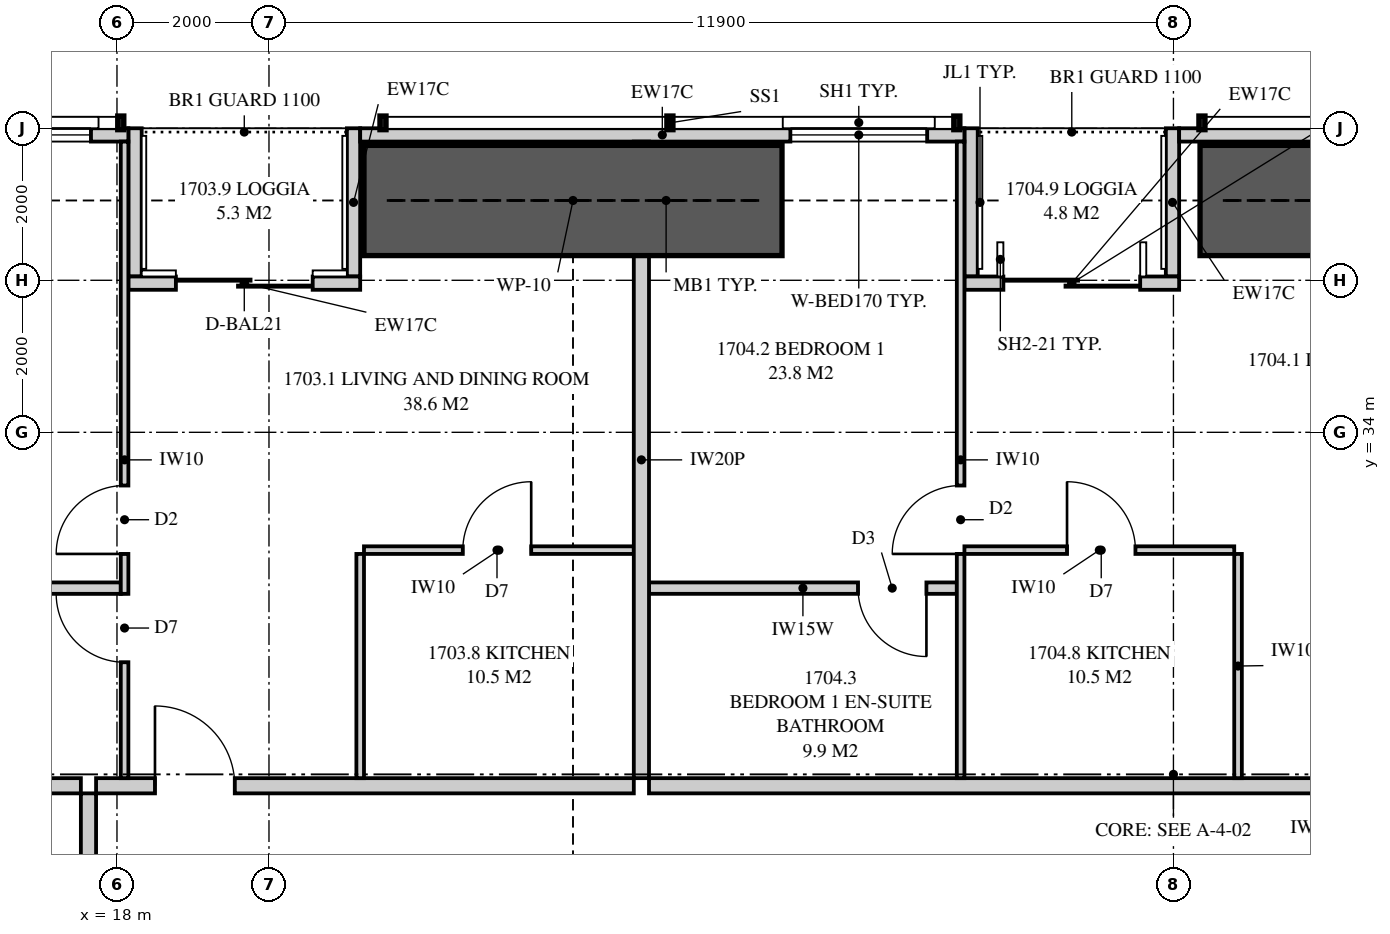
"""IFC4 building model, lengths in metres.
Left out: names, types, materials, properties, quantities, classifications, styles, units other than length and angle.
Written with IfcOpenShell. Run it as: python <this file> out.ifc"""

import sys

from ifc_helpers import new_model, si_unit, direction, frame, frame_2d, origin, place, context, subcontext, project, spatial, polyline, rectangle, outline, extrude, element, fill, save


model = new_model("IFC4")
c1 = context("Model", 3, precision=1e-05, world=origin(), true_north=direction((0.0, 1.0)))
c2 = subcontext(c1, "Body", "Model", "MODEL_VIEW")
j1 = project(units=[si_unit("LENGTHUNIT", "METRE"), si_unit("PLANEANGLEUNIT", "RADIAN")], contexts=[c1])
p1 = place(None, origin())
s1 = spatial("IfcSite", under=j1, at=p1, CompositionType="ELEMENT")
p2 = place(p1, origin())
s2 = spatial("IfcBuilding", under=s1, at=p2, CompositionType="ELEMENT")
p3 = place(p2, frame((0.0, 0.0, 64.55)))
s3 = spatial("IfcBuildingStorey", under=s2, at=p3, CompositionType="ELEMENT", Elevation=64.55)
p4 = place(p3, frame((42.949, 37.913, 0.0), z_axis=(0.0, 0.0, 1.0), x_axis=(-1.0, 0.0, 0.0)))
e1 = element("IfcWall", 1, at=p4, inside=s3, PredefinedType="SOLIDWALL", context=c2, shape_type="SweptSolid", body=[
    extrude(outline(polyline([(0.0, 0.0), (10.974, 0.0), (10.974, 2.15), (7.949, 2.15), (7.949, 3.11), (7.793, 3.11), (7.793, 2.15), (7.745, 2.15), (7.745, 3.11), (0.0, 3.11), (0.0, 0.0)])), frame((0.0, 0.087, 0.0), z_axis=(0.0, -1.0, 0.0), x_axis=(1.0, 0.0, 0.0)), (0.0, 0.0, 1.0), 0.175),
])
p5 = place(p4, frame((2.249, 0.0, 0.4)))
e2 = element("IfcOpeningElement", 2, at=p5, cuts=e1, PredefinedType="OPENING", context=c2, shape_type="SweptSolid", body=[
    extrude(rectangle(XDim=1.8, YDim=1.7, at=frame_2d((0.9, 0.85))), frame((0.0, 0.097, 0.0), z_axis=(0.0, -1.0, 0.0), x_axis=(1.0, 0.0, 0.0)), (0.0, 0.0, 1.0), 0.195),
])
p6 = place(p3, frame((29.15, 37.913, 0.0), z_axis=(0.0, 0.0, 1.0), x_axis=(-1.0, 0.0, 0.0)))
e3 = element("IfcWall", 3, at=p6, inside=s3, PredefinedType="SOLIDWALL", context=c2, shape_type="SweptSolid", body=[
    extrude(rectangle(XDim=7.95, YDim=0.175, at=frame_2d((3.975, 0.0))), origin(), (0.0, 0.0, 1.0), 2.15),
])
p7 = place(p6, frame((0.49, 0.0, 0.4)))
e4 = element("IfcOpeningElement", 4, at=p7, cuts=e3, PredefinedType="OPENING", context=c2, shape_type="SweptSolid", body=[
    extrude(rectangle(XDim=1.8, YDim=1.7, at=frame_2d((0.9, 0.85))), frame((0.0, 0.097, 0.0), z_axis=(0.0, -1.0, 0.0), x_axis=(1.0, 0.0, 0.0)), (0.0, 0.0, 1.0), 0.195),
])
p8 = place(p3, frame((18.15, 37.913, 0.0), z_axis=(0.0, 0.0, 1.0), x_axis=(-1.0, 0.0, 0.0)))
e5 = element("IfcWall", 5, at=p8, inside=s3, PredefinedType="SOLIDWALL", context=c2, shape_type="SweptSolid", body=[
    extrude(outline(polyline([(0.0, 0.0), (13.099, 0.0), (13.099, 3.11), (5.354, 3.11), (5.354, 2.15), (5.306, 2.15), (5.306, 3.11), (5.15, 3.11), (5.15, 2.15), (0.0, 2.15), (0.0, 0.0)])), frame((0.0, 0.087, 0.0), z_axis=(0.0, -1.0, 0.0), x_axis=(1.0, 0.0, 0.0)), (0.0, 0.0, 1.0), 0.175),
])
p9 = place(p8, frame((0.492, 0.0, 0.4)))
e6 = element("IfcOpeningElement", 6, at=p9, cuts=e5, PredefinedType="OPENING", context=c2, shape_type="SweptSolid", body=[
    extrude(rectangle(XDim=1.8, YDim=1.7, at=frame_2d((0.9, 0.85))), frame((0.0, 0.097, 0.0), z_axis=(0.0, -1.0, 0.0), x_axis=(1.0, 0.0, 0.0)), (0.0, 0.0, 1.0), 0.195),
])
p10 = place(p8, frame((8.065, 0.0, 0.4)))
e7 = element("IfcOpeningElement", 7, at=p10, cuts=e5, PredefinedType="OPENING", context=c2, shape_type="SweptSolid", body=[
    extrude(rectangle(XDim=1.8, YDim=1.7, at=frame_2d((0.9, 0.85))), frame((0.0, 0.097, 0.0), z_axis=(0.0, -1.0, 0.0), x_axis=(1.0, 0.0, 0.0)), (0.0, 0.0, 1.0), 0.195),
])
p11 = place(p3, frame((31.975, 35.962, 0.0), z_axis=(0.0, 0.0, 1.0), x_axis=(-1.0, 0.0, 0.0)))
e8 = element("IfcWall", 8, at=p11, inside=s3, PredefinedType="SOLIDWALL", context=c2, shape_type="SweptSolid", body=[
    extrude(rectangle(XDim=2.825, YDim=0.175, at=frame_2d((1.413, 0.0))), origin(), (0.0, 0.0, 1.0), 3.11),
])
p12 = place(p11, frame((0.512, 0.0, 0.0)))
e9 = element("IfcOpeningElement", 9, at=p12, cuts=e8, PredefinedType="OPENING", context=c2, shape_type="SweptSolid", body=[
    extrude(rectangle(XDim=1.8, YDim=2.1, at=frame_2d((0.9, 1.05))), frame((0.0, 0.097, 0.0), z_axis=(0.0, -1.0, 0.0), x_axis=(1.0, 0.0, 0.0)), (0.0, 0.0, 1.0), 0.195),
])
for number, where, z_axis, x_axis in (
    (10, (31.887, 38.0, 0.0), (0.0, 0.0, 1.0), (0.0, -1.0, 0.0)),
    (11, (29.238, 38.0, 0.0), (0.0, 0.0, 1.0), (0.0, -1.0, 0.0)),
):
    element("IfcWall", number, at=place(p3, frame(where, z_axis=z_axis, x_axis=x_axis)), inside=s3, PredefinedType="SOLIDWALL", context=c2, shape_type="SweptSolid", body=[
        extrude(outline(polyline([(0.0, 0.0), (1.95, 0.0), (1.95, 3.11), (1.75, 3.11), (1.75, 2.15), (0.15, 2.15), (0.15, 3.11), (0.0, 3.11), (0.0, 0.0)])), frame((0.0, 0.087, 0.0), z_axis=(0.0, -1.0, 0.0), x_axis=(1.0, 0.0, 0.0)), (0.0, 0.0, 1.0), 0.175),
    ])
p13 = place(p3, frame((21.2, 35.962, 0.0), z_axis=(0.0, 0.0, 1.0), x_axis=(-1.0, 0.0, 0.0)))
e12 = element("IfcWall", 12, at=p13, inside=s3, PredefinedType="SOLIDWALL", context=c2, shape_type="SweptSolid", body=[
    extrude(rectangle(XDim=3.05, YDim=0.175, at=frame_2d((1.525, 0.0))), origin(), (0.0, 0.0, 1.0), 3.11),
])
p14 = place(p13, frame((0.625, 0.0, 0.0)))
e13 = element("IfcOpeningElement", 13, at=p14, cuts=e12, PredefinedType="OPENING", context=c2, shape_type="SweptSolid", body=[
    extrude(rectangle(XDim=1.8, YDim=2.1, at=frame_2d((0.9, 1.05))), frame((0.0, 0.097, 0.0), z_axis=(0.0, -1.0, 0.0), x_axis=(1.0, 0.0, 0.0)), (0.0, 0.0, 1.0), 0.195),
])
for number, where, z_axis, x_axis in (
    (14, (21.113, 38.0, 0.0), (0.0, 0.0, 1.0), (0.0, -1.0, 0.0)),
    (15, (18.238, 38.0, 0.0), (0.0, 0.0, 1.0), (0.0, -1.0, 0.0)),
):
    element("IfcWall", number, at=place(p3, frame(where, z_axis=z_axis, x_axis=x_axis)), inside=s3, PredefinedType="SOLIDWALL", context=c2, shape_type="SweptSolid", body=[
        extrude(outline(polyline([(0.0, 0.0), (1.95, 0.0), (1.95, 3.11), (1.75, 3.11), (1.75, 2.15), (0.15, 2.15), (0.15, 3.11), (0.0, 3.11), (0.0, 0.0)])), frame((0.0, 0.087, 0.0), z_axis=(0.0, -1.0, 0.0), x_axis=(1.0, 0.0, 0.0)), (0.0, 0.0, 1.0), 0.175),
    ])
p15 = place(p3, frame((24.9, 37.825, 0.0), z_axis=(0.0, 0.0, 1.0), x_axis=(0.0, -1.0, 0.0)))
e16 = element("IfcWall", 16, at=p15, inside=s3, PredefinedType="PARTITIONING", context=c2, shape_type="SweptSolid", body=[
    extrude(outline(polyline([(0.529, 2.15), (0.0, 2.15), (0.0, 0.0), (0.529, 0.0), (0.529, 0.889), (1.021, 0.889), (1.021, 0.0), (8.375, 0.0), (8.375, 3.11), (1.685, 3.11), (1.685, 2.15), (1.021, 2.15), (1.021, 1.261), (0.529, 1.261), (0.529, 2.15)])), frame((0.0, 0.1, 0.0), z_axis=(0.0, -1.0, 0.0), x_axis=(1.0, 0.0, 0.0)), (0.0, 0.0, 1.0), 0.2),
])
p16 = place(p3, frame((17.725, 29.35, 0.0), z_axis=(0.0, 0.0, 1.0), x_axis=(1.0, 0.0, 0.0)))
e17 = element("IfcWall", 17, at=p16, inside=s3, PredefinedType="PARTITIONING", context=c2, shape_type="SweptSolid", body=[
    extrude(outline(polyline([(0.0, 0.0), (7.075, 0.0), (7.075, 3.11), (6.612, 3.11), (6.612, 2.541), (5.938, 2.541), (5.938, 3.11), (0.0, 3.11), (0.0, 0.0)])), frame((0.0, 0.1, 0.0), z_axis=(0.0, -1.0, 0.0), x_axis=(1.0, 0.0, 0.0)), (0.0, 0.0, 1.0), 0.2),
])
p17 = place(p16, frame((0.775, 0.0, 0.0)))
e18 = element("IfcOpeningElement", 18, at=p17, cuts=e17, PredefinedType="OPENING", context=c2, shape_type="SweptSolid", body=[
    extrude(rectangle(XDim=1.05, YDim=2.2, at=frame_2d((0.525, 1.1))), frame((0.0, 0.11, 0.0), z_axis=(0.0, -1.0, 0.0), x_axis=(1.0, 0.0, 0.0)), (0.0, 0.0, 1.0), 0.22),
])
p18 = place(p3, frame((18.1, 37.825, 0.0), z_axis=(0.0, 0.0, 1.0), x_axis=(0.0, -1.0, 0.0)))
e19 = element("IfcWall", 19, at=p18, inside=s3, PredefinedType="PARTITIONING", context=c2, shape_type="SweptSolid", body=[
    extrude(outline(polyline([(0.0, 0.0), (8.375, 0.0), (8.375, 3.11), (1.635, 3.11), (1.635, 2.15), (0.0, 2.15), (0.0, 3.11), (0.0, 0.0)])), frame((0.0, 0.05, 0.0), z_axis=(0.0, -1.0, 0.0), x_axis=(1.0, 0.0, 0.0)), (0.0, 0.0, 1.0), 0.1),
])
p19 = place(p18, frame((4.525, 0.0, 0.0)))
e20 = element("IfcOpeningElement", 20, at=p19, cuts=e19, PredefinedType="OPENING", context=c2, shape_type="SweptSolid", body=[
    extrude(rectangle(XDim=0.9, YDim=2.1, at=frame_2d((0.45, 1.05))), frame((0.0, 0.06, 0.0), z_axis=(0.0, -1.0, 0.0), x_axis=(1.0, 0.0, 0.0)), (0.0, 0.0, 1.0), 0.12),
])
p20 = place(p18, frame((5.95, 0.0, 0.0)))
e21 = element("IfcOpeningElement", 21, at=p20, cuts=e19, PredefinedType="OPENING", context=c2, shape_type="SweptSolid", body=[
    extrude(rectangle(XDim=0.9, YDim=2.1, at=frame_2d((0.45, 1.05))), frame((0.0, 0.06, 0.0), z_axis=(0.0, -1.0, 0.0), x_axis=(1.0, 0.0, 0.0)), (0.0, 0.0, 1.0), 0.12),
])
p21 = place(p3, frame((13.85, 31.95, 0.0), z_axis=(0.0, 0.0, 1.0), x_axis=(1.0, 0.0, 0.0)))
e22 = element("IfcWall", 22, at=p21, inside=s3, PredefinedType="PLUMBINGWALL", context=c2, shape_type="SweptSolid", body=[
    extrude(rectangle(XDim=4.2, YDim=0.15, at=frame_2d((2.1, 0.0))), origin(), (0.0, 0.0, 1.0), 3.11),
])
p22 = place(p3, frame((21.25, 32.45, 0.0), z_axis=(0.0, 0.0, 1.0), x_axis=(1.0, 0.0, 0.0)))
e23 = element("IfcWall", 23, at=p22, inside=s3, PredefinedType="PARTITIONING", context=c2, shape_type="SweptSolid", body=[
    extrude(outline(polyline([(0.0, 0.0), (3.55, 0.0), (3.55, 3.11), (3.037, 3.11), (3.037, 2.541), (2.463, 2.541), (2.463, 3.11), (0.0, 3.11), (0.0, 0.0)])), frame((0.0, 0.05, 0.0), z_axis=(0.0, -1.0, 0.0), x_axis=(1.0, 0.0, 0.0)), (0.0, 0.0, 1.0), 0.1),
])
p23 = place(p22, frame((1.3, 0.0, 0.0)))
e24 = element("IfcOpeningElement", 24, at=p23, cuts=e23, PredefinedType="OPENING", context=c2, shape_type="SweptSolid", body=[
    extrude(rectangle(XDim=0.9, YDim=2.1, at=frame_2d((0.45, 1.05))), frame((0.0, 0.06, 0.0), z_axis=(0.0, -1.0, 0.0), x_axis=(1.0, 0.0, 0.0)), (0.0, 0.0, 1.0), 0.12),
])
p24 = place(p3, frame((21.2, 32.4, 0.0), z_axis=(0.0, 0.0, 1.0), x_axis=(0.0, -1.0, 0.0)))
e25 = element("IfcWall", 25, at=p24, inside=s3, PredefinedType="PARTITIONING", context=c2, shape_type="SweptSolid", body=[
    extrude(rectangle(XDim=2.95, YDim=0.1, at=frame_2d((1.475, 0.0))), origin(), (0.0, 0.0, 1.0), 3.11),
])
p25 = place(p3, frame((25.0, 29.35, 0.0), z_axis=(0.0, 0.0, 1.0), x_axis=(1.0, 0.0, 0.0)))
e26 = element("IfcWall", 26, at=p25, inside=s3, PredefinedType="PARTITIONING", context=c2, shape_type="SweptSolid", body=[
    extrude(rectangle(XDim=9.05, YDim=0.2, at=frame_2d((4.525, 0.0))), origin(), (0.0, 0.0, 1.0), 3.11),
])
p26 = place(p3, frame((29.1, 37.825, 0.0), z_axis=(0.0, 0.0, 1.0), x_axis=(0.0, -1.0, 0.0)))
e27 = element("IfcWall", 27, at=p26, inside=s3, PredefinedType="PARTITIONING", context=c2, shape_type="SweptSolid", body=[
    extrude(outline(polyline([(0.0, 0.0), (8.375, 0.0), (8.375, 3.11), (1.635, 3.11), (1.635, 2.15), (0.0, 2.15), (0.0, 3.11), (0.0, 0.0)])), frame((0.0, 0.05, 0.0), z_axis=(0.0, -1.0, 0.0), x_axis=(1.0, 0.0, 0.0)), (0.0, 0.0, 1.0), 0.1),
])
p27 = place(p26, frame((4.525, 0.0, 0.0)))
e28 = element("IfcOpeningElement", 28, at=p27, cuts=e27, PredefinedType="OPENING", context=c2, shape_type="SweptSolid", body=[
    extrude(rectangle(XDim=0.9, YDim=2.1, at=frame_2d((0.45, 1.05))), frame((0.0, 0.06, 0.0), z_axis=(0.0, -1.0, 0.0), x_axis=(1.0, 0.0, 0.0)), (0.0, 0.0, 1.0), 0.12),
])
p28 = place(p3, frame((25.0, 31.95, 0.0), z_axis=(0.0, 0.0, 1.0), x_axis=(1.0, 0.0, 0.0)))
e29 = element("IfcWall", 29, at=p28, inside=s3, PredefinedType="PLUMBINGWALL", context=c2, shape_type="SweptSolid", body=[
    extrude(rectangle(XDim=4.05, YDim=0.15, at=frame_2d((2.025, 0.0))), origin(), (0.0, 0.0, 1.0), 3.11),
])
p29 = place(p28, frame((2.75, 0.0, 0.0)))
e30 = element("IfcOpeningElement", 30, at=p29, cuts=e29, PredefinedType="OPENING", context=c2, shape_type="SweptSolid", body=[
    extrude(rectangle(XDim=0.9, YDim=2.1, at=frame_2d((0.45, 1.05))), frame((0.0, 0.085, 0.0), z_axis=(0.0, -1.0, 0.0), x_axis=(1.0, 0.0, 0.0)), (0.0, 0.0, 1.0), 0.17),
])
p30 = place(p3, frame((29.15, 32.45, 0.0), z_axis=(0.0, 0.0, 1.0), x_axis=(1.0, 0.0, 0.0)))
e31 = element("IfcWall", 31, at=p30, inside=s3, PredefinedType="PARTITIONING", context=c2, shape_type="SweptSolid", body=[
    extrude(rectangle(XDim=3.55, YDim=0.1, at=frame_2d((1.775, 0.0))), origin(), (0.0, 0.0, 1.0), 3.11),
])
p31 = place(p30, frame((1.35, 0.0, 0.0)))
e32 = element("IfcOpeningElement", 32, at=p31, cuts=e31, PredefinedType="OPENING", context=c2, shape_type="SweptSolid", body=[
    extrude(rectangle(XDim=0.9, YDim=2.1, at=frame_2d((0.45, 1.05))), frame((0.0, 0.06, 0.0), z_axis=(0.0, -1.0, 0.0), x_axis=(1.0, 0.0, 0.0)), (0.0, 0.0, 1.0), 0.12),
])
p32 = place(p3, frame((32.75, 32.4, 0.0), z_axis=(0.0, 0.0, 1.0), x_axis=(0.0, -1.0, 0.0)))
e33 = element("IfcWall", 33, at=p32, inside=s3, PredefinedType="PARTITIONING", context=c2, shape_type="SweptSolid", body=[
    extrude(rectangle(XDim=2.95, YDim=0.1, at=frame_2d((1.475, 0.0))), origin(), (0.0, 0.0, 1.0), 3.11),
])
p33 = place(p3, frame((2.0, 29.35, 0.0), z_axis=(0.0, 0.0, 1.0), x_axis=(1.0, 0.0, 0.0)))
e34 = element("IfcWall", 34, at=p33, inside=s3, PredefinedType="PARTITIONING", context=c2, shape_type="SweptSolid", body=[
    extrude(outline(polyline([(0.0, 0.0), (15.525, 0.0), (15.525, 3.11), (11.337, 3.11), (11.337, 2.541), (10.663, 2.541), (10.663, 3.11), (9.51, 3.11), (9.51, 2.51), (6.89, 2.51), (6.89, 3.11), (2.969, 3.11), (2.969, 2.541), (2.577, 2.541), (2.577, 2.15), (0.733, 2.15), (0.733, 3.11), (0.0, 3.11), (0.0, 0.0)])), frame((0.0, 0.1, 0.0), z_axis=(0.0, -1.0, 0.0), x_axis=(1.0, 0.0, 0.0)), (0.0, 0.0, 1.0), 0.2),
])
p34 = place(p3, frame((17.625, 14.1, 0.0), z_axis=(0.0, 0.0, 1.0), x_axis=(0.0, 1.0, 0.0)))
e35 = element("IfcWall", 35, at=p34, inside=s3, PredefinedType="PARTITIONING", context=c2, shape_type="SweptSolid", body=[
    extrude(outline(polyline([(0.0, 0.0), (15.15, 0.0), (15.15, 3.11), (11.237, 3.11), (11.237, 2.541), (10.562, 2.541), (10.562, 3.11), (0.0, 3.11), (0.0, 0.0)])), frame((0.0, 0.1, 0.0), z_axis=(0.0, -1.0, 0.0), x_axis=(1.0, 0.0, 0.0)), (0.0, 0.0, 1.0), 0.2),
])
p35 = place(p34, frame((7.075, 0.0, 0.0)))
e36 = element("IfcOpeningElement", 36, at=p35, cuts=e35, PredefinedType="OPENING", context=c2, shape_type="SweptSolid", body=[
    extrude(rectangle(XDim=1.05, YDim=2.2, at=frame_2d((0.525, 1.1))), frame((0.0, 0.11, 0.0), z_axis=(0.0, -1.0, 0.0), x_axis=(1.0, 0.0, 0.0)), (0.0, 0.0, 1.0), 0.22),
])
for number, where, z_axis, x_axis in (
    (37, (32.25, 37.05, 0.0), (0.0, 0.0, 1.0), (1.0, 0.0, 0.0)),
    (38, (21.25, 37.05, 0.0), (0.0, 0.0, 1.0), (1.0, 0.0, 0.0)),
):
    element("IfcWall", number, at=place(p3, frame(where, z_axis=z_axis, x_axis=x_axis)), inside=s3, PredefinedType="SHEAR", context=c2, shape_type="SweptSolid", body=[
        extrude(rectangle(XDim=5.5, YDim=1.45, at=frame_2d((2.75, 0.0))), origin(), (0.0, 0.0, 1.0), 3.35),
    ])
p36 = place(p12, origin())
e39 = element("IfcDoor", 39, at=p36, inside=s3, OperationType="SLIDING_TO_LEFT", PredefinedType="DOOR", context=c2, shape_type="SweptSolid", body=[
    extrude(rectangle(XDim=1.8, YDim=2.1, at=frame_2d((0.9, 1.05))), frame((0.0, 0.025, 0.0), z_axis=(0.0, -1.0, 0.0), x_axis=(1.0, 0.0, 0.0)), (0.0, 0.0, 1.0), 0.05),
])
fill(e9, e39)
p37 = place(p7, origin())
e40 = element("IfcWindow", 40, at=p37, inside=s3, PartitioningType="SINGLE_PANEL", PredefinedType="WINDOW", context=c2, shape_type="SweptSolid", body=[
    extrude(rectangle(XDim=1.8, YDim=1.7, at=frame_2d((0.9, 0.85))), frame((0.0, 0.03, 0.0), z_axis=(0.0, -1.0, 0.0), x_axis=(1.0, 0.0, 0.0)), (0.0, 0.0, 1.0), 0.06),
])
fill(e4, e40)
p38 = place(p14, origin())
e41 = element("IfcDoor", 41, at=p38, inside=s3, OperationType="SLIDING_TO_LEFT", PredefinedType="DOOR", context=c2, shape_type="SweptSolid", body=[
    extrude(rectangle(XDim=1.8, YDim=2.1, at=frame_2d((0.9, 1.05))), frame((0.0, 0.025, 0.0), z_axis=(0.0, -1.0, 0.0), x_axis=(1.0, 0.0, 0.0)), (0.0, 0.0, 1.0), 0.05),
])
fill(e13, e41)
p39 = place(p9, origin())
e42 = element("IfcWindow", 42, at=p39, inside=s3, PartitioningType="SINGLE_PANEL", PredefinedType="WINDOW", context=c2, shape_type="SweptSolid", body=[
    extrude(rectangle(XDim=1.8, YDim=1.7, at=frame_2d((0.9, 0.85))), frame((0.0, 0.03, 0.0), z_axis=(0.0, -1.0, 0.0), x_axis=(1.0, 0.0, 0.0)), (0.0, 0.0, 1.0), 0.06),
])
fill(e6, e42)
p40 = place(p17, origin())
e43 = element("IfcDoor", 43, at=p40, inside=s3, OperationType="SINGLE_SWING_LEFT", PredefinedType="DOOR", context=c2, shape_type="SweptSolid", body=[
    extrude(rectangle(XDim=1.05, YDim=2.2, at=frame_2d((0.525, 1.1))), frame((0.0, 0.025, 0.0), z_axis=(0.0, -1.0, 0.0), x_axis=(1.0, 0.0, 0.0)), (0.0, 0.0, 1.0), 0.05),
])
fill(e18, e43)
p41 = place(p19, frame((0.9, 0.0, 0.0), z_axis=(0.0, 0.0, 1.0), x_axis=(-1.0, 0.0, 0.0)))
e44 = element("IfcDoor", 44, at=p41, inside=s3, OperationType="SINGLE_SWING_LEFT", PredefinedType="DOOR", context=c2, shape_type="SweptSolid", body=[
    extrude(rectangle(XDim=0.9, YDim=2.1, at=frame_2d((0.45, 1.05))), frame((0.0, 0.025, 0.0), z_axis=(0.0, -1.0, 0.0), x_axis=(1.0, 0.0, 0.0)), (0.0, 0.0, 1.0), 0.05),
])
fill(e20, e44)
p42 = place(p20, frame((0.9, 0.0, 0.0), z_axis=(0.0, 0.0, 1.0), x_axis=(-1.0, 0.0, 0.0)))
e45 = element("IfcDoor", 45, at=p42, inside=s3, OperationType="SINGLE_SWING_RIGHT", PredefinedType="DOOR", context=c2, shape_type="SweptSolid", body=[
    extrude(rectangle(XDim=0.9, YDim=2.1, at=frame_2d((0.45, 1.05))), frame((0.0, 0.025, 0.0), z_axis=(0.0, -1.0, 0.0), x_axis=(1.0, 0.0, 0.0)), (0.0, 0.0, 1.0), 0.05),
])
fill(e21, e45)
p43 = place(p23, origin())
e46 = element("IfcDoor", 46, at=p43, inside=s3, OperationType="SINGLE_SWING_RIGHT", PredefinedType="DOOR", context=c2, shape_type="SweptSolid", body=[
    extrude(rectangle(XDim=0.9, YDim=2.1, at=frame_2d((0.45, 1.05))), frame((0.0, 0.025, 0.0), z_axis=(0.0, -1.0, 0.0), x_axis=(1.0, 0.0, 0.0)), (0.0, 0.0, 1.0), 0.05),
])
fill(e24, e46)
p44 = place(p27, frame((0.9, 0.0, 0.0), z_axis=(0.0, 0.0, 1.0), x_axis=(-1.0, 0.0, 0.0)))
e47 = element("IfcDoor", 47, at=p44, inside=s3, OperationType="SINGLE_SWING_LEFT", PredefinedType="DOOR", context=c2, shape_type="SweptSolid", body=[
    extrude(rectangle(XDim=0.9, YDim=2.1, at=frame_2d((0.45, 1.05))), frame((0.0, 0.025, 0.0), z_axis=(0.0, -1.0, 0.0), x_axis=(1.0, 0.0, 0.0)), (0.0, 0.0, 1.0), 0.05),
])
fill(e28, e47)
p45 = place(p29, frame((0.9, 0.0, 0.0), z_axis=(0.0, 0.0, 1.0), x_axis=(-1.0, 0.0, 0.0)))
e48 = element("IfcDoor", 48, at=p45, inside=s3, OperationType="SINGLE_SWING_LEFT", PredefinedType="DOOR", context=c2, shape_type="SweptSolid", body=[
    extrude(rectangle(XDim=0.9, YDim=2.1, at=frame_2d((0.45, 1.05))), frame((0.0, 0.025, 0.0), z_axis=(0.0, -1.0, 0.0), x_axis=(1.0, 0.0, 0.0)), (0.0, 0.0, 1.0), 0.05),
])
fill(e30, e48)
p46 = place(p31, origin())
e49 = element("IfcDoor", 49, at=p46, inside=s3, OperationType="SINGLE_SWING_LEFT", PredefinedType="DOOR", context=c2, shape_type="SweptSolid", body=[
    extrude(rectangle(XDim=0.9, YDim=2.1, at=frame_2d((0.45, 1.05))), frame((0.0, 0.025, 0.0), z_axis=(0.0, -1.0, 0.0), x_axis=(1.0, 0.0, 0.0)), (0.0, 0.0, 1.0), 0.05),
])
fill(e32, e49)
save(model, sys.argv[1])
